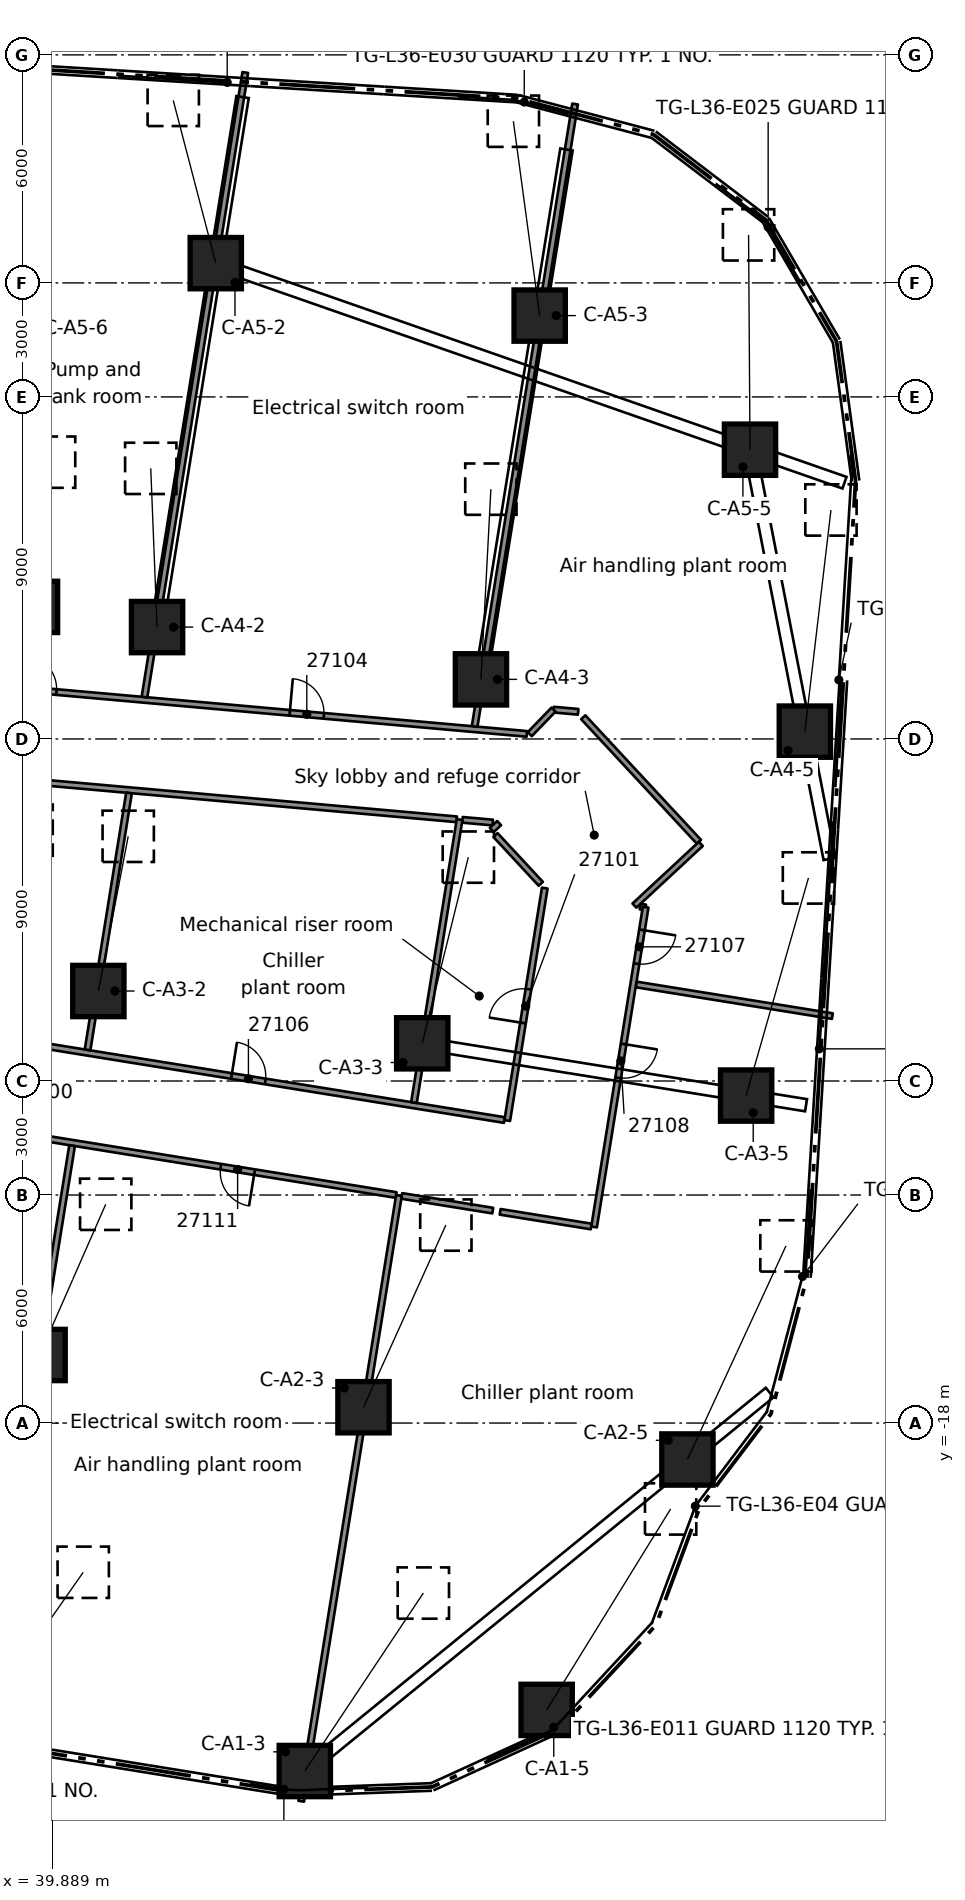
"""IFC4 building model, lengths in metres.
Left out: names, types, materials, properties, quantities, classifications, styles, units other than length and angle.
Written with IfcOpenShell. Run it as: python <this file> out.ifc"""

import sys

from ifc_helpers import new_model, si_unit, direction, frame, frame_2d, origin, origin_2d, place, context, subcontext, project, spatial, rectangle, extrude, element, fill, save


model = new_model("IFC4")
c1 = context("Model", 3, precision=1e-05, world=origin(), true_north=direction((0.0, 1.0)))
c2 = subcontext(c1, "Body", "Model", "MODEL_VIEW")
j1 = project(units=[si_unit("LENGTHUNIT", "METRE"), si_unit("PLANEANGLEUNIT", "RADIAN")], contexts=[c1])
p1 = place(None, origin())
s1 = spatial("IfcSite", under=j1, at=p1, CompositionType="ELEMENT")
p2 = place(p1, origin())
s2 = spatial("IfcBuilding", under=s1, at=p2, CompositionType="ELEMENT")
p3 = place(p2, frame((0.0, 0.0, 141.2)))
s3 = spatial("IfcBuildingStorey", under=s2, at=p3, CompositionType="ELEMENT", Elevation=141.2)
p4 = place(p3, frame((38.011, -25.785, 0.553), z_axis=(0.468842724866, 0.671791143978, 0.573483354783), x_axis=(-0.820040318321, 0.572305754233, 0.0)))
e1 = element("IfcColumn", 1, at=p4, inside=s3, PredefinedType="COLUMN", context=c2, shape_type="SweptSolid", body=[
    extrude(rectangle(XDim=1.35, YDim=1.35, at=origin_2d()), origin(), (0.0, 0.0, 1.0), 5.744),
])
p5 = place(p3, frame((46.535, -27.156, 0.585), z_axis=(0.480787238575, 0.721858234999, 0.497759299047), x_axis=(-0.832290525352, 0.554339680529, 0.0)))
e2 = element("IfcColumn", 2, at=p5, inside=s3, PredefinedType="COLUMN", context=c2, shape_type="SweptSolid", body=[
    extrude(rectangle(XDim=1.35, YDim=1.35, at=origin_2d()), origin(), (0.0, 0.0, 1.0), 6.488),
])
p6 = place(p3, frame((52.899, -25.547, 0.6), z_axis=(0.466787888169, 0.756586970001, 0.457913992233), x_axis=(-0.851057310823, 0.525072807994, 0.0)))
e3 = element("IfcColumn", 3, at=p6, inside=s3, PredefinedType="COLUMN", context=c2, shape_type="SweptSolid", body=[
    extrude(rectangle(XDim=1.35, YDim=1.35, at=origin_2d()), origin(), (0.0, 0.0, 1.0), 6.988),
])
p7 = place(p3, frame((39.556, -16.209, 0.535), z_axis=(0.31854234931, 0.725893965925, 0.609597180054), x_axis=(-0.915710327084, 0.401839018603, 0.0)))
e4 = element("IfcColumn", 4, at=p7, inside=s3, PredefinedType="COLUMN", context=c2, shape_type="SweptSolid", body=[
    extrude(rectangle(XDim=1.35, YDim=1.35, at=origin_2d()), origin(), (0.0, 0.0, 1.0), 5.462),
])
p8 = place(p3, frame((48.079, -17.584, 0.574), z_axis=(0.350418443914, 0.775058009341, 0.52582506247), x_axis=(-0.911197540169, 0.41196971101, 0.0)))
e5 = element("IfcColumn", 5, at=p8, inside=s3, PredefinedType="COLUMN", context=c2, shape_type="SweptSolid", body=[
    extrude(rectangle(XDim=1.35, YDim=1.35, at=origin_2d()), origin(), (0.0, 0.0, 1.0), 6.184),
])
p9 = place(p3, frame((56.603, -18.959, 0.6), z_axis=(0.372133685818, 0.806529075779, 0.459377154201), x_axis=(-0.908006713868, 0.418955615274, 0.0)))
e6 = element("IfcColumn", 6, at=p9, inside=s3, PredefinedType="COLUMN", context=c2, shape_type="SweptSolid", body=[
    extrude(rectangle(XDim=1.35, YDim=1.35, at=origin_2d()), origin(), (0.0, 0.0, 1.0), 6.968),
])
p10 = place(p3, frame((41.102, -6.632, 0.525), z_axis=(0.147457450281, 0.763672927503, 0.628537954428), x_axis=(-0.981863757507, 0.189587873278, 0.0)))
e7 = element("IfcColumn", 7, at=p10, inside=s3, PredefinedType="COLUMN", context=c2, shape_type="SweptSolid", body=[
    extrude(rectangle(XDim=1.35, YDim=1.35, at=origin_2d()), origin(), (0.0, 0.0, 1.0), 5.33),
])
p11 = place(p3, frame((49.625, -8.008, 0.567), z_axis=(0.201746311335, 0.814904031714, 0.543350572798), x_axis=(-0.970694824594, 0.240315537379, 0.0)))
e8 = element("IfcColumn", 8, at=p11, inside=s3, PredefinedType="COLUMN", context=c2, shape_type="SweptSolid", body=[
    extrude(rectangle(XDim=1.35, YDim=1.35, at=origin_2d()), origin(), (0.0, 0.0, 1.0), 6.012),
])
p12 = place(p3, frame((58.148, -9.383, 0.594), z_axis=(0.24237144992, 0.846171477585, 0.474605005015), x_axis=(-0.961341221194, 0.275359867143, 0.0)))
e9 = element("IfcColumn", 9, at=p12, inside=s3, PredefinedType="COLUMN", context=c2, shape_type="SweptSolid", body=[
    extrude(rectangle(XDim=1.35, YDim=1.35, at=origin_2d()), origin(), (0.0, 0.0, 1.0), 6.767),
])
p13 = place(p3, frame((37.811, -6.101, 0.514), z_axis=(0.272108426687, 0.711422790049, 0.647946462237), x_axis=(-0.93401073504, 0.357244939543, 0.0)))
e10 = element("IfcColumn", 10, at=p13, inside=s3, PredefinedType="COLUMN", context=c2, shape_type="SweptSolid", body=[
    extrude(rectangle(XDim=1.35, YDim=1.35, at=origin_2d()), origin(), (0.0, 0.0, 1.0), 5.204),
])
p14 = place(p3, frame((42.647, 2.944, 0.527), z_axis=(-0.031008623648, 0.780003687495, 0.625006170173), x_axis=(-0.999210726956, -0.039723080639, 0.0)))
e11 = element("IfcColumn", 11, at=p14, inside=s3, PredefinedType="COLUMN", context=c2, shape_type="SweptSolid", body=[
    extrude(rectangle(XDim=1.35, YDim=1.35, at=origin_2d()), origin(), (0.0, 0.0, 1.0), 5.354),
])
p15 = place(p3, frame((51.17, 1.568, 0.565), z_axis=(0.04361588417, 0.836413120188, 0.546361370363), x_axis=(-0.998643146119, 0.052075586498, 0.0)))
e12 = element("IfcColumn", 12, at=p15, inside=s3, PredefinedType="COLUMN", context=c2, shape_type="SweptSolid", body=[
    extrude(rectangle(XDim=1.35, YDim=1.35, at=origin_2d()), origin(), (0.0, 0.0, 1.0), 5.984),
])
p16 = place(p3, frame((59.693, 0.193, 0.592), z_axis=(0.102577531908, 0.871052081297, 0.480360408043), x_axis=(-0.993137259323, 0.116954624293, 0.0)))
e13 = element("IfcColumn", 13, at=p16, inside=s3, PredefinedType="COLUMN", context=c2, shape_type="SweptSolid", body=[
    extrude(rectangle(XDim=1.35, YDim=1.35, at=origin_2d()), origin(), (0.0, 0.0, 1.0), 6.695),
])
p17 = place(p3, frame((39.356, 3.475, 0.506), z_axis=(0.090491070758, 0.744011191678, 0.662011112272), x_axis=(-0.992684625922, 0.12073621436, 0.0)))
e14 = element("IfcColumn", 14, at=p17, inside=s3, PredefinedType="COLUMN", context=c2, shape_type="SweptSolid", body=[
    extrude(rectangle(XDim=1.35, YDim=1.35, at=origin_2d()), origin(), (0.0, 0.0, 1.0), 5.118),
])
p18 = place(p3, frame((44.192, 12.52, 0.54), z_axis=(-0.202235378763, 0.773948572578, 0.600087042504), x_axis=(-0.96751467614, -0.252814856078, 0.0)))
e15 = element("IfcColumn", 15, at=p18, inside=s3, PredefinedType="COLUMN", context=c2, shape_type="SweptSolid", body=[
    extrude(rectangle(XDim=1.35, YDim=1.35, at=origin_2d()), origin(), (0.0, 0.0, 1.0), 5.533),
])
p19 = place(p3, frame((52.715, 11.14, 0.571), z_axis=(-0.113403951698, 0.837909197957, 0.533898604341), x_axis=(-0.990965260422, -0.134118800463, 0.0)))
e16 = element("IfcColumn", 16, at=p19, inside=s3, PredefinedType="COLUMN", context=c2, shape_type="SweptSolid", body=[
    extrude(rectangle(XDim=1.35, YDim=1.35, at=origin_2d()), origin(), (0.0, 0.0, 1.0), 6.103),
])
p20 = place(p3, frame((58.25, 7.611, 0.586), z_axis=(-0.005850757888, 0.868387488092, 0.495851731021), x_axis=(-0.999977303841, -0.006737343846, 0.0)))
e17 = element("IfcColumn", 17, at=p20, inside=s3, PredefinedType="COLUMN", context=c2, shape_type="SweptSolid", body=[
    extrude(rectangle(XDim=1.35, YDim=1.35, at=origin_2d()), origin(), (0.0, 0.0, 1.0), 6.51),
])
p21 = place(p3, frame((51.553, -2.528, 0.0), z_axis=(0.0, 0.0, 1.0), x_axis=(0.680328051683, -0.732907730954, 0.0)))
e18 = element("IfcWall", 18, at=p21, inside=s3, PredefinedType="PARTITIONING", context=c2, shape_type="SweptSolid", body=[
    extrude(rectangle(XDim=1.75, YDim=0.15, at=frame_2d((0.875, 0.0))), origin(), (0.0, 0.0, 1.0), 3.98),
])
p22 = place(p3, frame((53.862, 0.571, 0.0), z_axis=(0.0, 0.0, 1.0), x_axis=(0.680553713689, -0.732698193517, 0.0)))
e19 = element("IfcWall", 19, at=p22, inside=s3, PredefinedType="PARTITIONING", context=c2, shape_type="SweptSolid", body=[
    extrude(rectangle(XDim=4.471, YDim=0.15, at=frame_2d((2.236, 0.0))), origin(), (0.0, 0.0, 1.0), 3.98),
])
p23 = place(p3, frame((48.938, -12.0, 0.0), z_axis=(0.0, 0.0, 1.0), x_axis=(-0.987231319148, 0.15929319663, 0.0)))
e20 = element("IfcWall", 20, at=p23, inside=s3, PredefinedType="PARTITIONING", context=c2, shape_type="SweptSolid", body=[
    extrude(rectangle(XDim=19.456, YDim=0.15, at=frame_2d((9.728, 0.0))), origin(), (0.0, 0.0, 1.0), 3.98),
])
p24 = place(p23, frame((16.275, 0.0, 0.0)))
e21 = element("IfcOpeningElement", 21, at=p24, cuts=e20, PredefinedType="OPENING", context=c2, shape_type="SweptSolid", body=[
    extrude(rectangle(XDim=0.9, YDim=2.1, at=frame_2d((0.45, 1.05))), frame((0.0, 0.085, 0.0), z_axis=(0.0, -1.0, 0.0), x_axis=(1.0, 0.0, 0.0)), (0.0, 0.0, 1.0), 0.17),
])
p25 = place(p23, frame((11.225, 0.0, 0.0)))
e22 = element("IfcOpeningElement", 22, at=p25, cuts=e20, PredefinedType="OPENING", context=c2, shape_type="SweptSolid", body=[
    extrude(rectangle(XDim=0.9, YDim=2.1, at=frame_2d((0.45, 1.05))), frame((0.0, 0.085, 0.0), z_axis=(0.0, -1.0, 0.0), x_axis=(1.0, 0.0, 0.0)), (0.0, 0.0, 1.0), 0.17),
])
p26 = place(p23, frame((3.775, 0.0, 0.0)))
e23 = element("IfcOpeningElement", 23, at=p26, cuts=e20, PredefinedType="OPENING", context=c2, shape_type="SweptSolid", body=[
    extrude(rectangle(XDim=0.9, YDim=2.1, at=frame_2d((0.45, 1.05))), frame((0.0, 0.085, 0.0), z_axis=(0.0, -1.0, 0.0), x_axis=(1.0, 0.0, 0.0)), (0.0, 0.0, 1.0), 0.17),
])
p27 = place(p3, frame((51.48, -12.41, 0.0), z_axis=(0.0, 0.0, 1.0), x_axis=(-0.987250819117, 0.159172297065, 0.0)))
e24 = element("IfcWall", 24, at=p27, inside=s3, PredefinedType="PARTITIONING", context=c2, shape_type="SweptSolid", body=[
    extrude(rectangle(XDim=2.425, YDim=0.15, at=frame_2d((1.212, 0.0))), origin(), (0.0, 0.0, 1.0), 3.98),
])
p28 = place(p3, frame((30.039, -6.518, 0.0), z_axis=(0.0, 0.0, 1.0), x_axis=(0.987233083285, -0.159282262876, 0.0)))
e25 = element("IfcWall", 25, at=p28, inside=s3, PredefinedType="PARTITIONING", context=c2, shape_type="SweptSolid", body=[
    extrude(rectangle(XDim=22.03, YDim=0.15, at=frame_2d((11.015, 0.0))), origin(), (0.0, 0.0, 1.0), 3.98),
])
p29 = place(p28, frame((8.457, 0.0, 0.0)))
e26 = element("IfcOpeningElement", 26, at=p29, cuts=e25, PredefinedType="OPENING", context=c2, shape_type="SweptSolid", body=[
    extrude(rectangle(XDim=0.9, YDim=2.1, at=frame_2d((0.45, 1.05))), frame((0.0, 0.085, 0.0), z_axis=(0.0, -1.0, 0.0), x_axis=(1.0, 0.0, 0.0)), (0.0, 0.0, 1.0), 0.17),
])
p30 = place(p28, frame((14.756, 0.0, 0.0)))
e27 = element("IfcOpeningElement", 27, at=p30, cuts=e25, PredefinedType="OPENING", context=c2, shape_type="SweptSolid", body=[
    extrude(rectangle(XDim=0.9, YDim=2.1, at=frame_2d((0.45, 1.05))), frame((0.0, 0.085, 0.0), z_axis=(0.0, -1.0, 0.0), x_axis=(1.0, 0.0, 0.0)), (0.0, 0.0, 1.0), 0.17),
])
p31 = place(p3, frame((55.252, -6.459, 0.0), z_axis=(0.0, 0.0, 1.0), x_axis=(0.987213656908, -0.1594026211, 0.0)))
e28 = element("IfcWall", 28, at=p31, inside=s3, PredefinedType="PARTITIONING", context=c2, shape_type="SweptSolid", body=[
    extrude(rectangle(XDim=5.232, YDim=0.15, at=frame_2d((2.616, 0.0))), origin(), (0.0, 0.0, 1.0), 3.98),
])
p32 = place(p3, frame((55.359, -4.41, 0.0), z_axis=(0.0, 0.0, 1.0), x_axis=(0.987283513707, -0.158969379326, 0.0)))
e29 = element("IfcWall", 29, at=p32, inside=s3, PredefinedType="PARTITIONING", context=c2, shape_type="SweptSolid", body=[
    extrude(rectangle(XDim=0.146, YDim=0.15, at=frame_2d((0.073, 0.0))), origin(), (0.0, 0.0, 1.0), 3.98),
])
p33 = place(p3, frame((51.675, -12.442, 0.0), z_axis=(0.0, 0.0, 1.0), x_axis=(0.98728137363, -0.15898266976, 0.0)))
e30 = element("IfcWall", 30, at=p33, inside=s3, PredefinedType="PARTITIONING", context=c2, shape_type="SweptSolid", body=[
    extrude(rectangle(XDim=2.428, YDim=0.15, at=frame_2d((1.214, 0.0))), origin(), (0.0, 0.0, 1.0), 3.98),
])
p34 = place(p3, frame((50.533, -2.114, 0.0), z_axis=(0.0, 0.0, 1.0), x_axis=(-0.996066129814, 0.088613007162, 0.0)))
e31 = element("IfcWall", 31, at=p34, inside=s3, PredefinedType="PARTITIONING", context=c2, shape_type="SweptSolid", body=[
    extrude(rectangle(XDim=19.556, YDim=0.15, at=frame_2d((9.778, 0.0))), origin(), (0.0, 0.0, 1.0), 3.98),
])
p35 = place(p34, frame((16.31, 0.0, 0.0)))
e32 = element("IfcOpeningElement", 32, at=p35, cuts=e31, PredefinedType="OPENING", context=c2, shape_type="SweptSolid", body=[
    extrude(rectangle(XDim=0.9, YDim=2.1, at=frame_2d((0.45, 1.05))), frame((0.0, 0.085, 0.0), z_axis=(0.0, -1.0, 0.0), x_axis=(1.0, 0.0, 0.0)), (0.0, 0.0, 1.0), 0.17),
])
p36 = place(p3, frame((50.683, -2.128, 0.0), z_axis=(0.0, 0.0, 1.0), x_axis=(0.996058889933, -0.088694350358, 0.0)))
e33 = element("IfcWall", 33, at=p36, inside=s3, PredefinedType="PARTITIONING", context=c2, shape_type="SweptSolid", body=[
    extrude(rectangle(XDim=0.801, YDim=0.15, at=frame_2d((0.4, 0.0))), origin(), (0.0, 0.0, 1.0), 3.98),
])
p37 = place(p3, frame((31.741, 1.969, 0.0), z_axis=(0.0, 0.0, 1.0), x_axis=(0.99606607926, -0.088613575412, 0.0)))
e34 = element("IfcWall", 34, at=p37, inside=s3, PredefinedType="PARTITIONING", context=c2, shape_type="SweptSolid", body=[
    extrude(rectangle(XDim=20.719, YDim=0.15, at=frame_2d((10.359, 0.0))), origin(), (0.0, 0.0, 1.0), 3.98),
])
p38 = place(p37, frame((2.1, 0.0, 0.0)))
e35 = element("IfcOpeningElement", 35, at=p38, cuts=e34, PredefinedType="OPENING", context=c2, shape_type="SweptSolid", body=[
    extrude(rectangle(XDim=0.9, YDim=2.1, at=frame_2d((0.45, 1.05))), frame((0.0, 0.085, 0.0), z_axis=(0.0, -1.0, 0.0), x_axis=(1.0, 0.0, 0.0)), (0.0, 0.0, 1.0), 0.17),
])
p39 = place(p37, frame((7.392, 0.0, 0.0)))
e36 = element("IfcOpeningElement", 36, at=p39, cuts=e34, PredefinedType="OPENING", context=c2, shape_type="SweptSolid", body=[
    extrude(rectangle(XDim=0.9, YDim=2.1, at=frame_2d((0.45, 1.05))), frame((0.0, 0.085, 0.0), z_axis=(0.0, -1.0, 0.0), x_axis=(1.0, 0.0, 0.0)), (0.0, 0.0, 1.0), 0.17),
])
p40 = place(p37, frame((14.455, 0.0, 0.0)))
e37 = element("IfcOpeningElement", 37, at=p40, cuts=e34, PredefinedType="OPENING", context=c2, shape_type="SweptSolid", body=[
    extrude(rectangle(XDim=0.9, YDim=2.1, at=frame_2d((0.45, 1.05))), frame((0.0, 0.085, 0.0), z_axis=(0.0, -1.0, 0.0), x_axis=(1.0, 0.0, 0.0)), (0.0, 0.0, 1.0), 0.17),
])
p41 = place(p3, frame((53.079, 0.772, 0.0), z_axis=(0.0, 0.0, 1.0), x_axis=(0.996048367631, -0.0888124391, 0.0)))
e38 = element("IfcWall", 38, at=p41, inside=s3, PredefinedType="PARTITIONING", context=c2, shape_type="SweptSolid", body=[
    extrude(rectangle(XDim=0.652, YDim=0.15, at=frame_2d((0.326, 0.0))), origin(), (0.0, 0.0, 1.0), 3.98),
])
p42 = place(p3, frame((55.208, -4.385, 0.0), z_axis=(0.0, 0.0, 1.0), x_axis=(0.732618540509, 0.680639459702, 0.0)))
e39 = element("IfcWall", 39, at=p42, inside=s3, PredefinedType="PARTITIONING", context=c2, shape_type="SweptSolid", body=[
    extrude(rectangle(XDim=2.386, YDim=0.15, at=frame_2d((1.193, 0.0))), origin(), (0.0, 0.0, 1.0), 3.98),
])
p43 = place(p3, frame((51.455, -2.394, 0.0), z_axis=(0.0, 0.0, 1.0), x_axis=(0.731209146759, 0.682153343242, 0.0)))
e40 = element("IfcWall", 40, at=p43, inside=s3, PredefinedType="PARTITIONING", context=c2, shape_type="SweptSolid", body=[
    extrude(rectangle(XDim=0.264, YDim=0.15, at=frame_2d((0.132, 0.0))), origin(), (0.0, 0.0, 1.0), 3.98),
])
p44 = place(p3, frame((55.504, -4.426, 0.0), z_axis=(0.0, 0.0, 1.0), x_axis=(-0.159212625054, -0.987244316278, 0.0)))
e41 = element("IfcWall", 41, at=p44, inside=s3, PredefinedType="PARTITIONING", context=c2, shape_type="SweptSolid", body=[
    extrude(rectangle(XDim=8.523, YDim=0.15, at=frame_2d((4.261, 0.0))), origin(), (0.0, 0.0, 1.0), 3.98),
])
p45 = place(p44, frame((0.606, 0.0, 0.0)))
e42 = element("IfcOpeningElement", 42, at=p45, cuts=e41, PredefinedType="OPENING", context=c2, shape_type="SweptSolid", body=[
    extrude(rectangle(XDim=0.9, YDim=2.1, at=frame_2d((0.45, 1.05))), frame((0.0, 0.085, 0.0), z_axis=(0.0, -1.0, 0.0), x_axis=(1.0, 0.0, 0.0)), (0.0, 0.0, 1.0), 0.17),
])
p46 = place(p44, frame((3.646, 0.0, 0.0)))
e43 = element("IfcOpeningElement", 43, at=p46, cuts=e41, PredefinedType="OPENING", context=c2, shape_type="SweptSolid", body=[
    extrude(rectangle(XDim=0.9, YDim=2.1, at=frame_2d((0.45, 1.05))), frame((0.0, 0.085, 0.0), z_axis=(0.0, -1.0, 0.0), x_axis=(1.0, 0.0, 0.0)), (0.0, 0.0, 1.0), 0.17),
])
p47 = place(p3, frame((51.862, -10.04, 0.0), z_axis=(0.0, 0.0, 1.0), x_axis=(0.159329081126, 0.987225528391, 0.0)))
e44 = element("IfcWall", 44, at=p47, inside=s3, PredefinedType="PARTITIONING", context=c2, shape_type="SweptSolid", body=[
    extrude(rectangle(XDim=6.195, YDim=0.15, at=frame_2d((3.098, 0.0))), origin(), (0.0, 0.0, 1.0), 3.98),
])
p48 = place(p47, frame((2.6, 0.0, 0.0)))
e45 = element("IfcOpeningElement", 45, at=p48, cuts=e44, PredefinedType="OPENING", context=c2, shape_type="SweptSolid", body=[
    extrude(rectangle(XDim=0.9, YDim=2.1, at=frame_2d((0.45, 1.05))), frame((0.0, 0.085, 0.0), z_axis=(0.0, -1.0, 0.0), x_axis=(1.0, 0.0, 0.0)), (0.0, 0.0, 1.0), 0.17),
])
p49 = place(p3, frame((46.44, -27.951, 0.0), z_axis=(0.0, 0.0, 1.0), x_axis=(0.159306129376, 0.987229232318, 0.0)))
e46 = element("IfcWall", 46, at=p49, inside=s3, PredefinedType="PARTITIONING", context=c2, shape_type="SweptSolid", body=[
    extrude(rectangle(XDim=16.145, YDim=0.15, at=frame_2d((8.073, 0.0))), origin(), (0.0, 0.0, 1.0), 3.98),
])
p50 = place(p3, frame((49.407, -9.568, 0.0), z_axis=(0.0, 0.0, 1.0), x_axis=(0.159205981762, 0.987245387617, 0.0)))
e47 = element("IfcWall", 47, at=p50, inside=s3, PredefinedType="PARTITIONING", context=c2, shape_type="SweptSolid", body=[
    extrude(rectangle(XDim=7.543, YDim=0.15, at=frame_2d((3.771, 0.0))), origin(), (0.0, 0.0, 1.0), 3.98),
])
p51 = place(p3, frame((51.004, 0.329, 0.0), z_axis=(0.0, 0.0, 1.0), x_axis=(0.159318497142, 0.98722723649, 0.0)))
e48 = element("IfcWall", 48, at=p51, inside=s3, PredefinedType="PARTITIONING", context=c2, shape_type="SweptSolid", body=[
    extrude(rectangle(XDim=16.59, YDim=0.15, at=frame_2d((8.295, 0.0))), origin(), (0.0, 0.0, 1.0), 3.98),
])
p52 = place(p3, frame((37.842, -26.619, 0.0), z_axis=(0.0, 0.0, 1.0), x_axis=(0.15930955413, 0.98722867967, 0.0)))
e49 = element("IfcWall", 49, at=p52, inside=s3, PredefinedType="PARTITIONING", context=c2, shape_type="SweptSolid", body=[
    extrude(rectangle(XDim=16.125, YDim=0.15, at=frame_2d((8.062, 0.0))), origin(), (0.0, 0.0, 1.0), 3.98),
])
p53 = place(p3, frame((40.818, -8.181, 0.0), z_axis=(0.0, 0.0, 1.0), x_axis=(0.159331101149, 0.987225202376, 0.0)))
e50 = element("IfcWall", 50, at=p53, inside=s3, PredefinedType="PARTITIONING", context=c2, shape_type="SweptSolid", body=[
    extrude(rectangle(XDim=6.846, YDim=0.15, at=frame_2d((3.423, 0.0))), origin(), (0.0, 0.0, 1.0), 3.98),
])
p54 = place(p3, frame((42.316, 1.103, 0.0), z_axis=(0.0, 0.0, 1.0), x_axis=(0.159316819836, 0.987227507172, 0.0)))
e51 = element("IfcWall", 51, at=p54, inside=s3, PredefinedType="PARTITIONING", context=c2, shape_type="SweptSolid", body=[
    extrude(rectangle(XDim=16.647, YDim=0.15, at=frame_2d((8.323, 0.0))), origin(), (0.0, 0.0, 1.0), 3.98),
])
p55 = place(p3, frame((52.453, 0.125, 0.0), z_axis=(0.0, 0.0, 1.0), x_axis=(0.69548917447, 0.718536574014, 0.0)))
e52 = element("IfcWall", 52, at=p55, inside=s3, PredefinedType="PARTITIONING", context=c2, shape_type="SweptSolid", body=[
    extrude(rectangle(XDim=0.9, YDim=0.15, at=frame_2d((0.45, 0.0))), origin(), (0.0, 0.0, 1.0), 3.98),
])
p56 = place(p48, origin())
e53 = element("IfcDoor", 53, at=p56, inside=s3, OperationType="SINGLE_SWING_LEFT", PredefinedType="DOOR", context=c2, shape_type="SweptSolid", body=[
    extrude(rectangle(XDim=0.9, YDim=2.1, at=frame_2d((0.45, 1.05))), frame((0.0, 0.025, 0.0), z_axis=(0.0, -1.0, 0.0), x_axis=(1.0, 0.0, 0.0)), (0.0, 0.0, 1.0), 0.05),
])
fill(e45, e53)
p57 = place(p39, origin())
e54 = element("IfcDoor", 54, at=p57, inside=s3, OperationType="SINGLE_SWING_LEFT", PredefinedType="DOOR", context=c2, shape_type="SweptSolid", body=[
    extrude(rectangle(XDim=0.9, YDim=2.1, at=frame_2d((0.45, 1.05))), frame((0.0, 0.025, 0.0), z_axis=(0.0, -1.0, 0.0), x_axis=(1.0, 0.0, 0.0)), (0.0, 0.0, 1.0), 0.05),
])
fill(e36, e54)
p58 = place(p40, origin())
e55 = element("IfcDoor", 55, at=p58, inside=s3, OperationType="SINGLE_SWING_RIGHT", PredefinedType="DOOR", context=c2, shape_type="SweptSolid", body=[
    extrude(rectangle(XDim=0.9, YDim=2.1, at=frame_2d((0.45, 1.05))), frame((0.0, 0.025, 0.0), z_axis=(0.0, -1.0, 0.0), x_axis=(1.0, 0.0, 0.0)), (0.0, 0.0, 1.0), 0.05),
])
fill(e37, e55)
p59 = place(p30, origin())
e56 = element("IfcDoor", 56, at=p59, inside=s3, OperationType="SINGLE_SWING_RIGHT", PredefinedType="DOOR", context=c2, shape_type="SweptSolid", body=[
    extrude(rectangle(XDim=0.9, YDim=2.1, at=frame_2d((0.45, 1.05))), frame((0.0, 0.025, 0.0), z_axis=(0.0, -1.0, 0.0), x_axis=(1.0, 0.0, 0.0)), (0.0, 0.0, 1.0), 0.05),
])
fill(e27, e56)
p60 = place(p45, origin())
e57 = element("IfcDoor", 57, at=p60, inside=s3, OperationType="SINGLE_SWING_LEFT", PredefinedType="DOOR", context=c2, shape_type="SweptSolid", body=[
    extrude(rectangle(XDim=0.9, YDim=2.1, at=frame_2d((0.45, 1.05))), frame((0.0, 0.025, 0.0), z_axis=(0.0, -1.0, 0.0), x_axis=(1.0, 0.0, 0.0)), (0.0, 0.0, 1.0), 0.05),
])
fill(e42, e57)
p61 = place(p46, origin())
e58 = element("IfcDoor", 58, at=p61, inside=s3, OperationType="SINGLE_SWING_LEFT", PredefinedType="DOOR", context=c2, shape_type="SweptSolid", body=[
    extrude(rectangle(XDim=0.9, YDim=2.1, at=frame_2d((0.45, 1.05))), frame((0.0, 0.025, 0.0), z_axis=(0.0, -1.0, 0.0), x_axis=(1.0, 0.0, 0.0)), (0.0, 0.0, 1.0), 0.05),
])
fill(e43, e58)
p62 = place(p26, origin())
e59 = element("IfcDoor", 59, at=p62, inside=s3, OperationType="SINGLE_SWING_LEFT", PredefinedType="DOOR", context=c2, shape_type="SweptSolid", body=[
    extrude(rectangle(XDim=0.9, YDim=2.1, at=frame_2d((0.45, 1.05))), frame((0.0, 0.025, 0.0), z_axis=(0.0, -1.0, 0.0), x_axis=(1.0, 0.0, 0.0)), (0.0, 0.0, 1.0), 0.05),
])
fill(e23, e59)
save(model, sys.argv[1])
